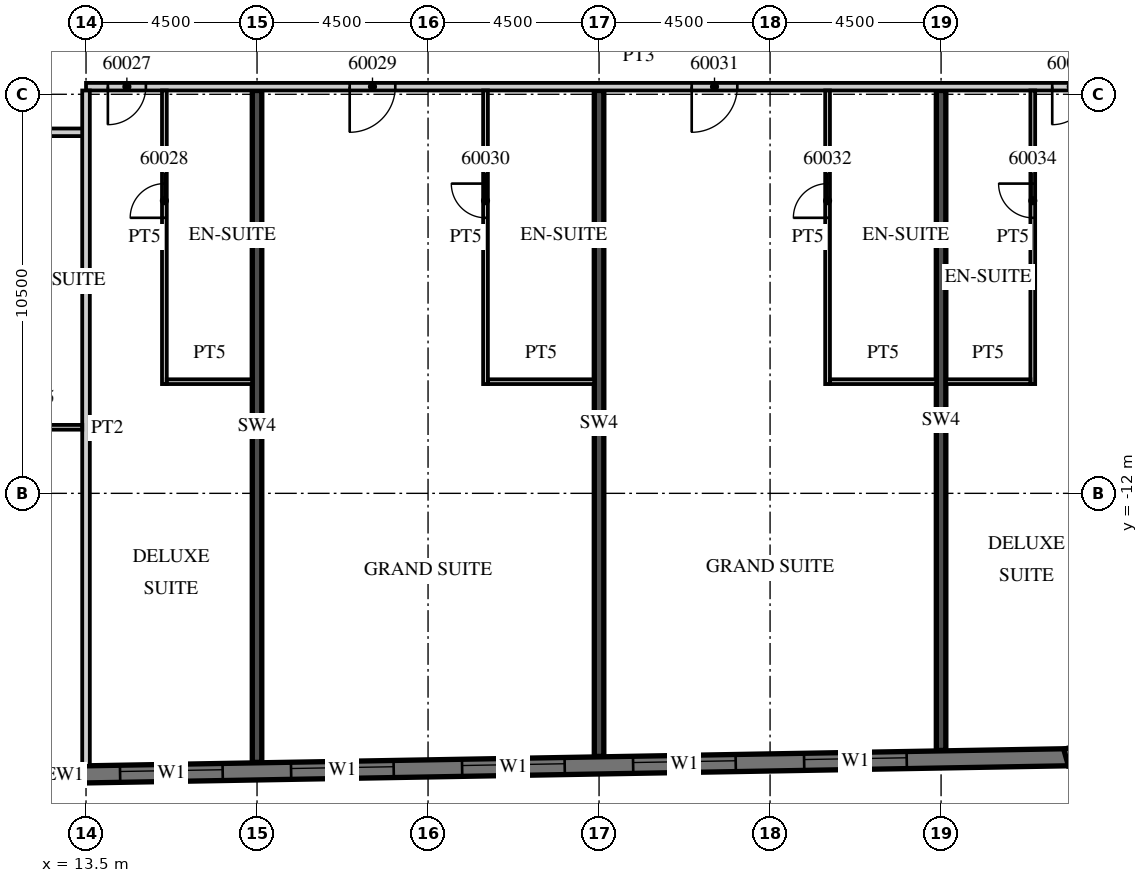
"""IFC4 building model, lengths in metres.
Left out: names, types, materials, properties, quantities, classifications, styles, units other than length and angle.
Written with IfcOpenShell. Run it as: python <this file> out.ifc"""

import sys

from ifc_helpers import new_model, si_unit, direction, frame, frame_2d, origin, place, context, subcontext, project, spatial, polyline, rectangle, outline, extrude, element, fill, save


model = new_model("IFC4")
c1 = context("Model", 3, precision=1e-05, world=origin(), true_north=direction((0.0, 1.0)))
c2 = subcontext(c1, "Body", "Model", "MODEL_VIEW")
j1 = project(units=[si_unit("LENGTHUNIT", "METRE"), si_unit("PLANEANGLEUNIT", "RADIAN")], contexts=[c1])
p1 = place(None, origin())
s1 = spatial("IfcSite", under=j1, at=p1, CompositionType="ELEMENT")
p2 = place(p1, origin())
s2 = spatial("IfcBuilding", under=s1, at=p2, CompositionType="ELEMENT")
p3 = place(p2, frame((0.0, 0.0, 244.1)))
s3 = spatial("IfcBuildingStorey", under=s2, at=p3, CompositionType="ELEMENT", Elevation=244.1)
p4 = place(p3, frame((18.0, -19.079, 0.0), z_axis=(0.0, 0.0, 1.0), x_axis=(0.0, 1.0, 0.0)))
e1 = element("IfcWall", 1, at=p4, inside=s3, PredefinedType="SHEAR", context=c2, shape_type="SweptSolid", body=[
    extrude(rectangle(XDim=17.679, YDim=0.25, at=frame_2d((8.84, 0.0))), origin(), (0.0, 0.0, 1.0), 3.3),
])
p5 = place(p3, frame((27.0, -18.922, 0.0), z_axis=(0.0, 0.0, 1.0), x_axis=(0.0, 1.0, 0.0)))
e2 = element("IfcWall", 2, at=p5, inside=s3, PredefinedType="SHEAR", context=c2, shape_type="SweptSolid", body=[
    extrude(rectangle(XDim=17.522, YDim=0.25, at=frame_2d((8.761, 0.0))), origin(), (0.0, 0.0, 1.0), 3.3),
])
p6 = place(p3, frame((36.0, -18.765, 0.0), z_axis=(0.0, 0.0, 1.0), x_axis=(0.0, 1.0, 0.0)))
e3 = element("IfcWall", 3, at=p6, inside=s3, PredefinedType="SHEAR", context=c2, shape_type="SweptSolid", body=[
    extrude(rectangle(XDim=17.365, YDim=0.25, at=frame_2d((8.683, 0.0))), origin(), (0.0, 0.0, 1.0), 3.3),
])
p7 = place(p3, frame((-13.504, -19.866, 0.0), z_axis=(0.0, 0.0, 1.0), x_axis=(0.999847672978, 0.017453676992, 0.0)))
e4 = element("IfcWall", 4, at=p7, inside=s3, PredefinedType="SOLIDWALL", context=c2, shape_type="SweptSolid", body=[
    extrude(rectangle(XDim=52.86, YDim=0.45, at=frame_2d((26.43, 0.0))), origin(), (0.0, 0.0, 1.0), 3.02),
])
p8 = place(p7, frame((0.9, 0.0, 0.45)))
e5 = element("IfcOpeningElement", 5, at=p8, cuts=e4, PredefinedType="OPENING", context=c2, shape_type="SweptSolid", body=[
    extrude(rectangle(XDim=2.7, YDim=2.25, at=frame_2d((1.35, 1.125))), frame((0.0, 0.235, 0.0), z_axis=(0.0, -1.0, 0.0), x_axis=(1.0, 0.0, 0.0)), (0.0, 0.0, 1.0), 0.47),
])
p9 = place(p7, frame((5.401, 0.0, 0.45)))
e6 = element("IfcOpeningElement", 6, at=p9, cuts=e4, PredefinedType="OPENING", context=c2, shape_type="SweptSolid", body=[
    extrude(rectangle(XDim=2.7, YDim=2.25, at=frame_2d((1.35, 1.125))), frame((0.0, 0.235, 0.0), z_axis=(0.0, -1.0, 0.0), x_axis=(1.0, 0.0, 0.0)), (0.0, 0.0, 1.0), 0.47),
])
p10 = place(p7, frame((9.902, 0.0, 0.45)))
e7 = element("IfcOpeningElement", 7, at=p10, cuts=e4, PredefinedType="OPENING", context=c2, shape_type="SweptSolid", body=[
    extrude(rectangle(XDim=2.7, YDim=2.25, at=frame_2d((1.35, 1.125))), frame((0.0, 0.235, 0.0), z_axis=(0.0, -1.0, 0.0), x_axis=(1.0, 0.0, 0.0)), (0.0, 0.0, 1.0), 0.47),
])
p11 = place(p7, frame((14.402, 0.0, 0.45)))
e8 = element("IfcOpeningElement", 8, at=p11, cuts=e4, PredefinedType="OPENING", context=c2, shape_type="SweptSolid", body=[
    extrude(rectangle(XDim=2.7, YDim=2.25, at=frame_2d((1.35, 1.125))), frame((0.0, 0.235, 0.0), z_axis=(0.0, -1.0, 0.0), x_axis=(1.0, 0.0, 0.0)), (0.0, 0.0, 1.0), 0.47),
])
p12 = place(p7, frame((18.903, 0.0, 0.45)))
e9 = element("IfcOpeningElement", 9, at=p12, cuts=e4, PredefinedType="OPENING", context=c2, shape_type="SweptSolid", body=[
    extrude(rectangle(XDim=2.7, YDim=2.25, at=frame_2d((1.35, 1.125))), frame((0.0, 0.235, 0.0), z_axis=(0.0, -1.0, 0.0), x_axis=(1.0, 0.0, 0.0)), (0.0, 0.0, 1.0), 0.47),
])
p13 = place(p7, frame((23.404, 0.0, 0.45)))
e10 = element("IfcOpeningElement", 10, at=p13, cuts=e4, PredefinedType="OPENING", context=c2, shape_type="SweptSolid", body=[
    extrude(rectangle(XDim=2.7, YDim=2.25, at=frame_2d((1.35, 1.125))), frame((0.0, 0.235, 0.0), z_axis=(0.0, -1.0, 0.0), x_axis=(1.0, 0.0, 0.0)), (0.0, 0.0, 1.0), 0.47),
])
p14 = place(p7, frame((27.904, 0.0, 0.45)))
e11 = element("IfcOpeningElement", 11, at=p14, cuts=e4, PredefinedType="OPENING", context=c2, shape_type="SweptSolid", body=[
    extrude(rectangle(XDim=2.7, YDim=2.25, at=frame_2d((1.35, 1.125))), frame((0.0, 0.235, 0.0), z_axis=(0.0, -1.0, 0.0), x_axis=(1.0, 0.0, 0.0)), (0.0, 0.0, 1.0), 0.47),
])
p15 = place(p7, frame((32.405, 0.0, 0.45)))
e12 = element("IfcOpeningElement", 12, at=p15, cuts=e4, PredefinedType="OPENING", context=c2, shape_type="SweptSolid", body=[
    extrude(rectangle(XDim=2.7, YDim=2.25, at=frame_2d((1.35, 1.125))), frame((0.0, 0.235, 0.0), z_axis=(0.0, -1.0, 0.0), x_axis=(1.0, 0.0, 0.0)), (0.0, 0.0, 1.0), 0.47),
])
p16 = place(p7, frame((36.906, 0.0, 0.45)))
e13 = element("IfcOpeningElement", 13, at=p16, cuts=e4, PredefinedType="OPENING", context=c2, shape_type="SweptSolid", body=[
    extrude(rectangle(XDim=2.7, YDim=2.25, at=frame_2d((1.35, 1.125))), frame((0.0, 0.235, 0.0), z_axis=(0.0, -1.0, 0.0), x_axis=(1.0, 0.0, 0.0)), (0.0, 0.0, 1.0), 0.47),
])
p17 = place(p7, frame((41.406, 0.0, 0.45)))
e14 = element("IfcOpeningElement", 14, at=p17, cuts=e4, PredefinedType="OPENING", context=c2, shape_type="SweptSolid", body=[
    extrude(rectangle(XDim=2.7, YDim=2.25, at=frame_2d((1.35, 1.125))), frame((0.0, 0.235, 0.0), z_axis=(0.0, -1.0, 0.0), x_axis=(1.0, 0.0, 0.0)), (0.0, 0.0, 1.0), 0.47),
])
p18 = place(p7, frame((45.907, 0.0, 0.45)))
e15 = element("IfcOpeningElement", 15, at=p18, cuts=e4, PredefinedType="OPENING", context=c2, shape_type="SweptSolid", body=[
    extrude(rectangle(XDim=2.7, YDim=2.25, at=frame_2d((1.35, 1.125))), frame((0.0, 0.235, 0.0), z_axis=(0.0, -1.0, 0.0), x_axis=(1.0, 0.0, 0.0)), (0.0, 0.0, 1.0), 0.47),
])
p19 = place(p3, frame((39.29, -18.952, 0.0), z_axis=(0.0, 0.0, 1.0), x_axis=(0.961247584925, 0.275686562016, 0.0)))
e16 = element("IfcWall", 16, at=p19, inside=s3, PredefinedType="SOLIDWALL", context=c2, shape_type="SweptSolid", body=[
    extrude(outline(polyline([(0.0, -0.225), (2.071, -0.225), (1.95, 0.225), (0.121, 0.225), (0.0, -0.225)])), origin(), (0.0, 0.0, 1.0), 3.02),
])
p20 = place(p19, frame((0.435, 0.0, 0.45)))
e17 = element("IfcOpeningElement", 17, at=p20, cuts=e16, PredefinedType="OPENING", context=c2, shape_type="SweptSolid", body=[
    extrude(rectangle(XDim=1.2, YDim=2.25, at=frame_2d((0.6, 1.125))), frame((0.0, 0.235, 0.0), z_axis=(0.0, -1.0, 0.0), x_axis=(1.0, 0.0, 0.0)), (0.0, 0.0, 1.0), 0.47),
])
p21 = place(p3, frame((-13.5, -2.5, 0.0), z_axis=(0.0, 0.0, 1.0), x_axis=(1.0, 0.0, 0.0)))
e18 = element("IfcWall", 18, at=p21, inside=s3, PredefinedType="PARTITIONING", context=c2, shape_type="SweptSolid", body=[
    extrude(rectangle(XDim=27.0, YDim=0.2, at=frame_2d((13.5, 0.0))), origin(), (0.0, 0.0, 1.0), 3.02),
])
p22 = place(p21, frame((2.925, 0.0, 0.0)))
e19 = element("IfcOpeningElement", 19, at=p22, cuts=e18, PredefinedType="OPENING", context=c2, shape_type="SweptSolid", body=[
    extrude(rectangle(XDim=1.0, YDim=2.1, at=frame_2d((0.5, 1.05))), frame((0.0, 0.11, 0.0), z_axis=(0.0, -1.0, 0.0), x_axis=(1.0, 0.0, 0.0)), (0.0, 0.0, 1.0), 0.22),
])
p23 = place(p21, frame((5.075, 0.0, 0.0)))
e20 = element("IfcOpeningElement", 20, at=p23, cuts=e18, PredefinedType="OPENING", context=c2, shape_type="SweptSolid", body=[
    extrude(rectangle(XDim=1.0, YDim=2.1, at=frame_2d((0.5, 1.05))), frame((0.0, 0.11, 0.0), z_axis=(0.0, -1.0, 0.0), x_axis=(1.0, 0.0, 0.0)), (0.0, 0.0, 1.0), 0.22),
])
p24 = place(p21, frame((9.55, 0.0, 0.0)))
e21 = element("IfcOpeningElement", 21, at=p24, cuts=e18, PredefinedType="OPENING", context=c2, shape_type="SweptSolid", body=[
    extrude(rectangle(XDim=1.0, YDim=2.1, at=frame_2d((0.5, 1.05))), frame((0.0, 0.11, 0.0), z_axis=(0.0, -1.0, 0.0), x_axis=(1.0, 0.0, 0.0)), (0.0, 0.0, 1.0), 0.22),
])
p25 = place(p21, frame((14.075, 0.0, 0.0)))
e22 = element("IfcOpeningElement", 22, at=p25, cuts=e18, PredefinedType="OPENING", context=c2, shape_type="SweptSolid", body=[
    extrude(rectangle(XDim=1.0, YDim=2.1, at=frame_2d((0.5, 1.05))), frame((0.0, 0.11, 0.0), z_axis=(0.0, -1.0, 0.0), x_axis=(1.0, 0.0, 0.0)), (0.0, 0.0, 1.0), 0.22),
])
p26 = place(p21, frame((20.925, 0.0, 0.0)))
e23 = element("IfcOpeningElement", 23, at=p26, cuts=e18, PredefinedType="OPENING", context=c2, shape_type="SweptSolid", body=[
    extrude(rectangle(XDim=1.0, YDim=2.1, at=frame_2d((0.5, 1.05))), frame((0.0, 0.11, 0.0), z_axis=(0.0, -1.0, 0.0), x_axis=(1.0, 0.0, 0.0)), (0.0, 0.0, 1.0), 0.22),
])
p27 = place(p21, frame((23.075, 0.0, 0.0)))
e24 = element("IfcOpeningElement", 24, at=p27, cuts=e18, PredefinedType="OPENING", context=c2, shape_type="SweptSolid", body=[
    extrude(rectangle(XDim=1.0, YDim=2.1, at=frame_2d((0.5, 1.05))), frame((0.0, 0.11, 0.0), z_axis=(0.0, -1.0, 0.0), x_axis=(1.0, 0.0, 0.0)), (0.0, 0.0, 1.0), 0.22),
])
p28 = place(p3, frame((13.5, -1.3, 0.0), z_axis=(0.0, 0.0, 1.0), x_axis=(1.0, 0.0, 0.0)))
e25 = element("IfcWall", 25, at=p28, inside=s3, PredefinedType="PARTITIONING", context=c2, shape_type="SweptSolid", body=[
    extrude(rectangle(XDim=29.091, YDim=0.2, at=frame_2d((14.545, 0.0))), origin(), (0.0, 0.0, 1.0), 3.02),
])
p29 = place(p28, frame((0.575, 0.0, 0.0)))
e26 = element("IfcOpeningElement", 26, at=p29, cuts=e25, PredefinedType="OPENING", context=c2, shape_type="SweptSolid", body=[
    extrude(rectangle(XDim=1.0, YDim=2.1, at=frame_2d((0.5, 1.05))), frame((0.0, 0.11, 0.0), z_axis=(0.0, -1.0, 0.0), x_axis=(1.0, 0.0, 0.0)), (0.0, 0.0, 1.0), 0.22),
])
p30 = place(p28, frame((6.938, 0.0, 0.0)))
e27 = element("IfcOpeningElement", 27, at=p30, cuts=e25, PredefinedType="OPENING", context=c2, shape_type="SweptSolid", body=[
    extrude(rectangle(XDim=1.2, YDim=2.1, at=frame_2d((0.6, 1.05))), frame((0.0, 0.11, 0.0), z_axis=(0.0, -1.0, 0.0), x_axis=(1.0, 0.0, 0.0)), (0.0, 0.0, 1.0), 0.22),
])
p31 = place(p28, frame((15.938, 0.0, 0.0)))
e28 = element("IfcOpeningElement", 28, at=p31, cuts=e25, PredefinedType="OPENING", context=c2, shape_type="SweptSolid", body=[
    extrude(rectangle(XDim=1.2, YDim=2.1, at=frame_2d((0.6, 1.05))), frame((0.0, 0.11, 0.0), z_axis=(0.0, -1.0, 0.0), x_axis=(1.0, 0.0, 0.0)), (0.0, 0.0, 1.0), 0.22),
])
p32 = place(p28, frame((25.425, 0.0, 0.0)))
e29 = element("IfcOpeningElement", 29, at=p32, cuts=e25, PredefinedType="OPENING", context=c2, shape_type="SweptSolid", body=[
    extrude(rectangle(XDim=1.0, YDim=2.1, at=frame_2d((0.5, 1.05))), frame((0.0, 0.11, 0.0), z_axis=(0.0, -1.0, 0.0), x_axis=(1.0, 0.0, 0.0)), (0.0, 0.0, 1.0), 0.22),
])
p33 = place(p28, frame((27.611, 0.0, 0.0)))
e30 = element("IfcOpeningElement", 30, at=p33, cuts=e25, PredefinedType="OPENING", context=c2, shape_type="SweptSolid", body=[
    extrude(rectangle(XDim=1.0, YDim=2.4, at=frame_2d((0.5, 1.2))), frame((0.0, 0.11, 0.0), z_axis=(0.0, -1.0, 0.0), x_axis=(1.0, 0.0, 0.0)), (0.0, 0.0, 1.0), 0.22),
])
p34 = place(p3, frame((13.5, -19.17, 0.0), z_axis=(0.0, 0.0, 1.0), x_axis=(0.0, 1.0, 0.0)))
e31 = element("IfcWall", 31, at=p34, inside=s3, PredefinedType="PARTITIONING", context=c2, shape_type="SweptSolid", body=[
    extrude(rectangle(XDim=17.77, YDim=0.2, at=frame_2d((8.885, 0.0))), origin(), (0.0, 0.0, 1.0), 3.02),
])
p35 = place(p3, frame((11.15, -10.262, 0.0), z_axis=(0.0, 0.0, 1.0), x_axis=(1.0, 0.0, 0.0)))
e32 = element("IfcWall", 32, at=p35, inside=s3, PredefinedType="PARTITIONING", context=c2, shape_type="SweptSolid", body=[
    extrude(rectangle(XDim=2.25, YDim=0.125, at=frame_2d((1.125, 0.0))), origin(), (0.0, 0.0, 1.0), 3.02),
])
p36 = place(p3, frame((15.562, -9.125, 0.0), z_axis=(0.0, 0.0, 1.0), x_axis=(0.0, 1.0, 0.0)))
e33 = element("IfcWall", 33, at=p36, inside=s3, PredefinedType="PARTITIONING", context=c2, shape_type="SweptSolid", body=[
    extrude(rectangle(XDim=7.725, YDim=0.125, at=frame_2d((3.863, 0.0))), origin(), (0.0, 0.0, 1.0), 3.02),
])
p37 = place(p36, frame((4.375, 0.0, 0.0)))
e34 = element("IfcOpeningElement", 34, at=p37, cuts=e33, PredefinedType="OPENING", context=c2, shape_type="SweptSolid", body=[
    extrude(rectangle(XDim=0.9, YDim=2.1, at=frame_2d((0.45, 1.05))), frame((0.0, 0.073, 0.0), z_axis=(0.0, -1.0, 0.0), x_axis=(1.0, 0.0, 0.0)), (0.0, 0.0, 1.0), 0.145),
])
p38 = place(p3, frame((15.625, -9.062, 0.0), z_axis=(0.0, 0.0, 1.0), x_axis=(1.0, 0.0, 0.0)))
e35 = element("IfcWall", 35, at=p38, inside=s3, PredefinedType="PARTITIONING", context=c2, shape_type="SweptSolid", body=[
    extrude(rectangle(XDim=2.25, YDim=0.125, at=frame_2d((1.125, 0.0))), origin(), (0.0, 0.0, 1.0), 3.02),
])
p39 = place(p3, frame((24.012, -9.125, 0.0), z_axis=(0.0, 0.0, 1.0), x_axis=(0.0, 1.0, 0.0)))
e36 = element("IfcWall", 36, at=p39, inside=s3, PredefinedType="PARTITIONING", context=c2, shape_type="SweptSolid", body=[
    extrude(rectangle(XDim=7.725, YDim=0.125, at=frame_2d((3.863, 0.0))), origin(), (0.0, 0.0, 1.0), 3.02),
])
p40 = place(p39, frame((4.375, 0.0, 0.0)))
e37 = element("IfcOpeningElement", 37, at=p40, cuts=e36, PredefinedType="OPENING", context=c2, shape_type="SweptSolid", body=[
    extrude(rectangle(XDim=0.9, YDim=2.1, at=frame_2d((0.45, 1.05))), frame((0.0, 0.073, 0.0), z_axis=(0.0, -1.0, 0.0), x_axis=(1.0, 0.0, 0.0)), (0.0, 0.0, 1.0), 0.145),
])
p41 = place(p3, frame((24.075, -9.062, 0.0), z_axis=(0.0, 0.0, 1.0), x_axis=(1.0, 0.0, 0.0)))
e38 = element("IfcWall", 38, at=p41, inside=s3, PredefinedType="PARTITIONING", context=c2, shape_type="SweptSolid", body=[
    extrude(rectangle(XDim=2.8, YDim=0.125, at=frame_2d((1.4, 0.0))), origin(), (0.0, 0.0, 1.0), 3.02),
])
p42 = place(p3, frame((33.013, -9.125, 0.0), z_axis=(0.0, 0.0, 1.0), x_axis=(0.0, 1.0, 0.0)))
e39 = element("IfcWall", 39, at=p42, inside=s3, PredefinedType="PARTITIONING", context=c2, shape_type="SweptSolid", body=[
    extrude(rectangle(XDim=7.725, YDim=0.125, at=frame_2d((3.863, 0.0))), origin(), (0.0, 0.0, 1.0), 3.02),
])
p43 = place(p42, frame((4.375, 0.0, 0.0)))
e40 = element("IfcOpeningElement", 40, at=p43, cuts=e39, PredefinedType="OPENING", context=c2, shape_type="SweptSolid", body=[
    extrude(rectangle(XDim=0.9, YDim=2.1, at=frame_2d((0.45, 1.05))), frame((0.0, 0.073, 0.0), z_axis=(0.0, -1.0, 0.0), x_axis=(1.0, 0.0, 0.0)), (0.0, 0.0, 1.0), 0.145),
])
p44 = place(p3, frame((33.075, -9.062, 0.0), z_axis=(0.0, 0.0, 1.0), x_axis=(1.0, 0.0, 0.0)))
e41 = element("IfcWall", 41, at=p44, inside=s3, PredefinedType="PARTITIONING", context=c2, shape_type="SweptSolid", body=[
    extrude(rectangle(XDim=2.8, YDim=0.125, at=frame_2d((1.4, 0.0))), origin(), (0.0, 0.0, 1.0), 3.02),
])
p45 = place(p3, frame((38.413, -9.125, 0.0), z_axis=(0.0, 0.0, 1.0), x_axis=(0.0, 1.0, 0.0)))
e42 = element("IfcWall", 42, at=p45, inside=s3, PredefinedType="PARTITIONING", context=c2, shape_type="SweptSolid", body=[
    extrude(rectangle(XDim=7.725, YDim=0.125, at=frame_2d((3.863, 0.0))), origin(), (0.0, 0.0, 1.0), 3.02),
])
p46 = place(p45, frame((4.375, 0.0, 0.0)))
e43 = element("IfcOpeningElement", 43, at=p46, cuts=e42, PredefinedType="OPENING", context=c2, shape_type="SweptSolid", body=[
    extrude(rectangle(XDim=0.9, YDim=2.1, at=frame_2d((0.45, 1.05))), frame((0.0, 0.073, 0.0), z_axis=(0.0, -1.0, 0.0), x_axis=(1.0, 0.0, 0.0)), (0.0, 0.0, 1.0), 0.145),
])
p47 = place(p3, frame((36.125, -9.062, 0.0), z_axis=(0.0, 0.0, 1.0), x_axis=(1.0, 0.0, 0.0)))
e44 = element("IfcWall", 44, at=p47, inside=s3, PredefinedType="PARTITIONING", context=c2, shape_type="SweptSolid", body=[
    extrude(rectangle(XDim=2.225, YDim=0.125, at=frame_2d((1.113, 0.0))), origin(), (0.0, 0.0, 1.0), 3.02),
])
p48 = place(p14, origin())
e45 = element("IfcWindow", 45, at=p48, inside=s3, PartitioningType="SINGLE_PANEL", PredefinedType="WINDOW", context=c2, shape_type="SweptSolid", body=[
    extrude(rectangle(XDim=2.7, YDim=2.25, at=frame_2d((1.35, 1.125))), frame((0.0, 0.09, 0.0), z_axis=(0.0, -1.0, 0.0), x_axis=(1.0, 0.0, 0.0)), (0.0, 0.0, 1.0), 0.06),
])
fill(e11, e45)
p49 = place(p15, origin())
e46 = element("IfcWindow", 46, at=p49, inside=s3, PartitioningType="SINGLE_PANEL", PredefinedType="WINDOW", context=c2, shape_type="SweptSolid", body=[
    extrude(rectangle(XDim=2.7, YDim=2.25, at=frame_2d((1.35, 1.125))), frame((0.0, 0.09, 0.0), z_axis=(0.0, -1.0, 0.0), x_axis=(1.0, 0.0, 0.0)), (0.0, 0.0, 1.0), 0.06),
])
fill(e12, e46)
p50 = place(p16, origin())
e47 = element("IfcWindow", 47, at=p50, inside=s3, PartitioningType="SINGLE_PANEL", PredefinedType="WINDOW", context=c2, shape_type="SweptSolid", body=[
    extrude(rectangle(XDim=2.7, YDim=2.25, at=frame_2d((1.35, 1.125))), frame((0.0, 0.09, 0.0), z_axis=(0.0, -1.0, 0.0), x_axis=(1.0, 0.0, 0.0)), (0.0, 0.0, 1.0), 0.06),
])
fill(e13, e47)
p51 = place(p17, origin())
e48 = element("IfcWindow", 48, at=p51, inside=s3, PartitioningType="SINGLE_PANEL", PredefinedType="WINDOW", context=c2, shape_type="SweptSolid", body=[
    extrude(rectangle(XDim=2.7, YDim=2.25, at=frame_2d((1.35, 1.125))), frame((0.0, 0.09, 0.0), z_axis=(0.0, -1.0, 0.0), x_axis=(1.0, 0.0, 0.0)), (0.0, 0.0, 1.0), 0.06),
])
fill(e14, e48)
p52 = place(p18, origin())
e49 = element("IfcWindow", 49, at=p52, inside=s3, PartitioningType="SINGLE_PANEL", PredefinedType="WINDOW", context=c2, shape_type="SweptSolid", body=[
    extrude(rectangle(XDim=2.7, YDim=2.25, at=frame_2d((1.35, 1.125))), frame((0.0, 0.09, 0.0), z_axis=(0.0, -1.0, 0.0), x_axis=(1.0, 0.0, 0.0)), (0.0, 0.0, 1.0), 0.06),
])
fill(e15, e49)
p53 = place(p29, origin())
e50 = element("IfcDoor", 50, at=p53, inside=s3, OperationType="SINGLE_SWING_LEFT", PredefinedType="DOOR", context=c2, shape_type="SweptSolid", body=[
    extrude(rectangle(XDim=1.0, YDim=2.1, at=frame_2d((0.5, 1.05))), frame((0.0, 0.025, 0.0), z_axis=(0.0, -1.0, 0.0), x_axis=(1.0, 0.0, 0.0)), (0.0, 0.0, 1.0), 0.05),
])
fill(e26, e50)
p54 = place(p37, origin())
e51 = element("IfcDoor", 51, at=p54, inside=s3, OperationType="SINGLE_SWING_LEFT", PredefinedType="DOOR", context=c2, shape_type="SweptSolid", body=[
    extrude(rectangle(XDim=0.9, YDim=2.1, at=frame_2d((0.45, 1.05))), frame((0.0, 0.025, 0.0), z_axis=(0.0, -1.0, 0.0), x_axis=(1.0, 0.0, 0.0)), (0.0, 0.0, 1.0), 0.05),
])
fill(e34, e51)
p55 = place(p30, origin())
e52 = element("IfcDoor", 52, at=p55, inside=s3, OperationType="SINGLE_SWING_LEFT", PredefinedType="DOOR", context=c2, shape_type="SweptSolid", body=[
    extrude(rectangle(XDim=1.2, YDim=2.1, at=frame_2d((0.6, 1.05))), frame((0.0, 0.025, 0.0), z_axis=(0.0, -1.0, 0.0), x_axis=(1.0, 0.0, 0.0)), (0.0, 0.0, 1.0), 0.05),
])
fill(e27, e52)
p56 = place(p40, origin())
e53 = element("IfcDoor", 53, at=p56, inside=s3, OperationType="SINGLE_SWING_RIGHT", PredefinedType="DOOR", context=c2, shape_type="SweptSolid", body=[
    extrude(rectangle(XDim=0.9, YDim=2.1, at=frame_2d((0.45, 1.05))), frame((0.0, 0.025, 0.0), z_axis=(0.0, -1.0, 0.0), x_axis=(1.0, 0.0, 0.0)), (0.0, 0.0, 1.0), 0.05),
])
fill(e37, e53)
p57 = place(p31, origin())
e54 = element("IfcDoor", 54, at=p57, inside=s3, OperationType="SINGLE_SWING_LEFT", PredefinedType="DOOR", context=c2, shape_type="SweptSolid", body=[
    extrude(rectangle(XDim=1.2, YDim=2.1, at=frame_2d((0.6, 1.05))), frame((0.0, 0.025, 0.0), z_axis=(0.0, -1.0, 0.0), x_axis=(1.0, 0.0, 0.0)), (0.0, 0.0, 1.0), 0.05),
])
fill(e28, e54)
p58 = place(p43, origin())
e55 = element("IfcDoor", 55, at=p58, inside=s3, OperationType="SINGLE_SWING_LEFT", PredefinedType="DOOR", context=c2, shape_type="SweptSolid", body=[
    extrude(rectangle(XDim=0.9, YDim=2.1, at=frame_2d((0.45, 1.05))), frame((0.0, 0.025, 0.0), z_axis=(0.0, -1.0, 0.0), x_axis=(1.0, 0.0, 0.0)), (0.0, 0.0, 1.0), 0.05),
])
fill(e40, e55)
p59 = place(p32, origin())
e56 = element("IfcDoor", 56, at=p59, inside=s3, OperationType="SINGLE_SWING_LEFT", PredefinedType="DOOR", context=c2, shape_type="SweptSolid", body=[
    extrude(rectangle(XDim=1.0, YDim=2.1, at=frame_2d((0.5, 1.05))), frame((0.0, 0.025, 0.0), z_axis=(0.0, -1.0, 0.0), x_axis=(1.0, 0.0, 0.0)), (0.0, 0.0, 1.0), 0.05),
])
fill(e29, e56)
p60 = place(p46, origin())
e57 = element("IfcDoor", 57, at=p60, inside=s3, OperationType="SINGLE_SWING_RIGHT", PredefinedType="DOOR", context=c2, shape_type="SweptSolid", body=[
    extrude(rectangle(XDim=0.9, YDim=2.1, at=frame_2d((0.45, 1.05))), frame((0.0, 0.025, 0.0), z_axis=(0.0, -1.0, 0.0), x_axis=(1.0, 0.0, 0.0)), (0.0, 0.0, 1.0), 0.05),
])
fill(e43, e57)
save(model, sys.argv[1])
